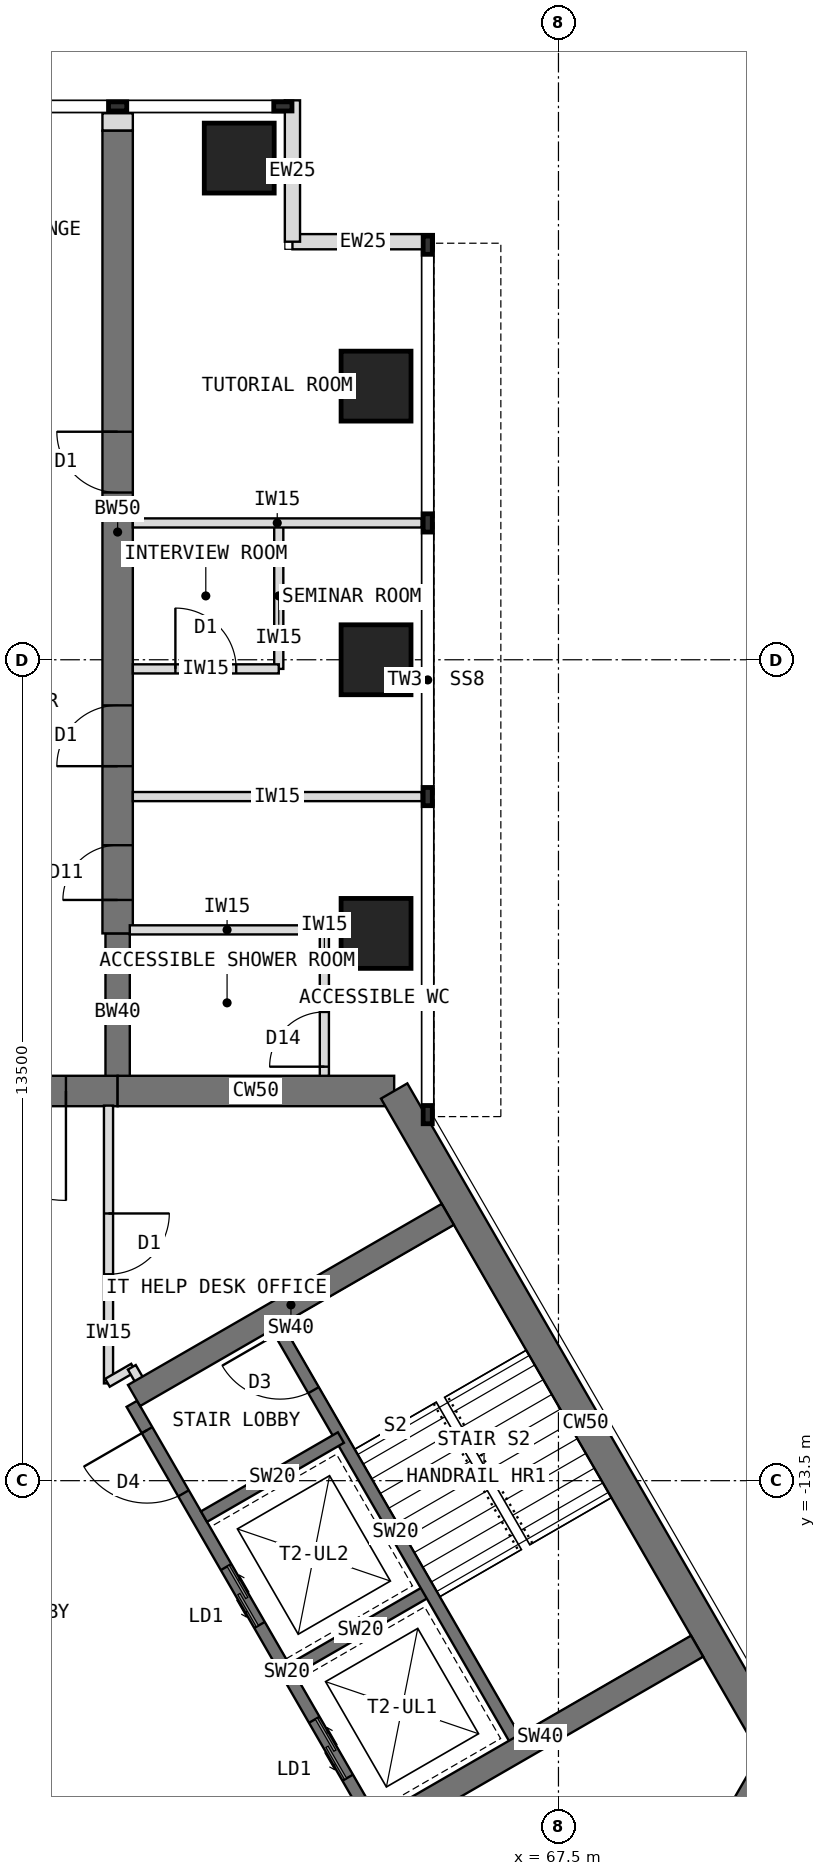
"""IFC4 building model, lengths in metres.
Left out: names, types, materials, properties, quantities, classifications, styles, units other than length and angle.
Written with IfcOpenShell. Run it as: python <this file> out.ifc"""

import sys

from ifc_helpers import new_model, si_unit, direction, frame, frame_2d, origin, origin_2d, place, context, subcontext, project, spatial, rectangle, extrude, element, fill, save


model = new_model("IFC4")
c1 = context("Model", 3, precision=1e-05, world=origin(), true_north=direction((0.0, 1.0)))
c2 = subcontext(c1, "Body", "Model", "MODEL_VIEW")
j1 = project(units=[si_unit("LENGTHUNIT", "METRE"), si_unit("PLANEANGLEUNIT", "RADIAN")], contexts=[c1])
p1 = place(None, origin())
s1 = spatial("IfcSite", under=j1, at=p1, CompositionType="ELEMENT")
p2 = place(p1, origin())
s2 = spatial("IfcBuilding", under=s1, at=p2, CompositionType="ELEMENT")
p3 = place(p2, frame((0.0, 0.0, 194.5)))
s3 = spatial("IfcBuildingStorey", under=s2, at=p3, CompositionType="ELEMENT", Elevation=194.5)
p4 = place(p3, frame((64.798, -7.092, 0.0), z_axis=(0.0, 0.0, 1.0), x_axis=(-1.0, 0.0, 0.0)))
e1 = element("IfcWall", 1, at=p4, inside=s3, PredefinedType="SHEAR", context=c2, shape_type="SweptSolid", body=[
    extrude(rectangle(XDim=4.548, YDim=0.5, at=frame_2d((2.274, 0.0))), origin(), (0.0, 0.0, 1.0), 4.0),
])
p5 = place(p3, frame((60.25, -7.092, 0.0), z_axis=(0.0, 0.0, 1.0), x_axis=(-1.0, 0.0, 0.0)))
e2 = element("IfcWall", 2, at=p5, inside=s3, PredefinedType="SHEAR", context=c2, shape_type="SweptSolid", body=[
    extrude(rectangle(XDim=3.5, YDim=0.5, at=frame_2d((1.75, 0.0))), origin(), (0.0, 0.0, 1.0), 4.0),
])
p6 = place(p5, frame((0.85, 0.0, 0.0)))
e3 = element("IfcOpeningElement", 3, at=p6, cuts=e2, PredefinedType="OPENING", context=c2, shape_type="SweptSolid", body=[
    extrude(rectangle(XDim=1.8, YDim=2.1, at=frame_2d((0.9, 1.05))), frame((0.0, 0.26, 0.0), z_axis=(0.0, -1.0, 0.0), x_axis=(1.0, 0.0, 0.0)), (0.0, 0.0, 1.0), 0.52),
])
p7 = place(p3, frame((68.822, -21.939, 0.0), z_axis=(0.0, 0.0, 1.0), x_axis=(0.500024481964, 0.866011268655, 0.0)))
e4 = element("IfcWall", 4, at=p7, inside=s3, PredefinedType="SHEAR", context=c2, shape_type="SweptSolid", body=[
    extrude(rectangle(XDim=4.548, YDim=0.5, at=frame_2d((2.274, 0.0))), origin(), (0.0, 0.0, 1.0), 4.0),
])
p8 = place(p3, frame((71.096, -18.0, 0.0), z_axis=(0.0, 0.0, 1.0), x_axis=(-0.500005998175, 0.866021940709, 0.0)))
e5 = element("IfcWall", 5, at=p8, inside=s3, PredefinedType="SHEAR", context=c2, shape_type="SweptSolid", body=[
    extrude(rectangle(XDim=12.596, YDim=0.5, at=frame_2d((6.298, 0.0))), origin(), (0.0, 0.0, 1.0), 4.0),
])
p9 = place(p3, frame((60.25, -7.092, 0.0), z_axis=(0.0, 0.0, 1.0), x_axis=(0.0, 1.0, 0.0)))
e6 = element("IfcWall", 6, at=p9, inside=s3, PredefinedType="SHEAR", context=c2, shape_type="SweptSolid", body=[
    extrude(rectangle(XDim=2.592, YDim=0.4, at=frame_2d((1.296, 0.0))), origin(), (0.0, 0.0, 1.0), 4.0),
])
p10 = place(p3, frame((60.25, -4.5, 0.0), z_axis=(0.0, 0.0, 1.0), x_axis=(0.0, 1.0, 0.0)))
e7 = element("IfcWall", 7, at=p10, inside=s3, PredefinedType="SHEAR", context=c2, shape_type="SweptSolid", body=[
    extrude(rectangle(XDim=13.2, YDim=0.5, at=frame_2d((6.6, 0.0))), origin(), (0.0, 0.0, 1.0), 4.0),
])
p11 = place(p10, frame((0.55, 0.0, 0.0)))
e8 = element("IfcOpeningElement", 8, at=p11, cuts=e7, PredefinedType="OPENING", context=c2, shape_type="SweptSolid", body=[
    extrude(rectangle(XDim=0.9, YDim=2.1, at=frame_2d((0.45, 1.05))), frame((0.0, 0.26, 0.0), z_axis=(0.0, -1.0, 0.0), x_axis=(1.0, 0.0, 0.0)), (0.0, 0.0, 1.0), 0.52),
])
p12 = place(p10, frame((2.75, 0.0, 0.0)))
e9 = element("IfcOpeningElement", 9, at=p12, cuts=e7, PredefinedType="OPENING", context=c2, shape_type="SweptSolid", body=[
    extrude(rectangle(XDim=1.0, YDim=2.1, at=frame_2d((0.5, 1.05))), frame((0.0, 0.26, 0.0), z_axis=(0.0, -1.0, 0.0), x_axis=(1.0, 0.0, 0.0)), (0.0, 0.0, 1.0), 0.52),
])
p13 = place(p10, frame((7.25, 0.0, 0.0)))
e10 = element("IfcOpeningElement", 10, at=p13, cuts=e7, PredefinedType="OPENING", context=c2, shape_type="SweptSolid", body=[
    extrude(rectangle(XDim=1.0, YDim=2.1, at=frame_2d((0.5, 1.05))), frame((0.0, 0.26, 0.0), z_axis=(0.0, -1.0, 0.0), x_axis=(1.0, 0.0, 0.0)), (0.0, 0.0, 1.0), 0.52),
])
for number, where, z_axis, x_axis in (
    (11, (64.5, -4.5, 0.0), (0.0, 0.0, 1.0), (1.0, 0.0, 0.0)),
    (12, (64.5, 0.0, 0.0), (0.0, 0.0, 1.0), (1.0, 0.0, 0.0)),
    (13, (64.5, 4.5, 0.0), (0.0, 0.0, 1.0), (1.0, 0.0, 0.0)),
    (14, (62.25, 8.25, 0.0), (0.0, 0.0, 1.0), (1.0, 0.0, 0.0)),
):
    element("IfcColumn", number, at=place(p3, frame(where, z_axis=z_axis, x_axis=x_axis)), inside=s3, PredefinedType="COLUMN", context=c2, shape_type="SweptSolid", body=[
        extrude(rectangle(XDim=1.15, YDim=1.15, at=origin_2d()), origin(), (0.0, 0.0, 1.0), 4.0),
    ])
for number, where, z_axis, x_axis in (
    (15, (65.45, 6.875, 0.0), (0.0, 0.0, 1.0), (-1.0, 0.0, 0.0)),
    (16, (63.125, 6.875, 0.0), (0.0, 0.0, 1.0), (0.0, 1.0, 0.0)),
):
    element("IfcWall", number, at=place(p3, frame(where, z_axis=z_axis, x_axis=x_axis)), inside=s3, PredefinedType="STANDARD", context=c2, shape_type="SweptSolid", body=[
        extrude(rectangle(XDim=2.325, YDim=0.25, at=frame_2d((1.163, 0.0))), origin(), (0.0, 0.0, 1.0), 3.8),
    ])
p14 = place(p3, frame((60.25, 8.7, 0.0), z_axis=(0.0, 0.0, 1.0), x_axis=(0.0, 1.0, 0.0)))
e17 = element("IfcWall", 17, at=p14, inside=s3, PredefinedType="PARTITIONING", context=c2, shape_type="SweptSolid", body=[
    extrude(rectangle(XDim=0.288, YDim=0.5, at=frame_2d((0.144, 0.0))), origin(), (0.0, 0.0, 1.0), 3.8),
])
p15 = place(p3, frame((64.484, -19.164, 0.0), z_axis=(0.0, 0.0, 1.0), x_axis=(-0.49999894854, 0.866026010844, 0.0)))
e18 = element("IfcWall", 18, at=p15, inside=s3, PredefinedType="SHEAR", context=c2, shape_type="SweptSolid", body=[
    extrude(rectangle(XDim=8.0, YDim=0.2, at=frame_2d((4.0, 0.0))), origin(), (0.0, 0.0, 1.0), 4.0),
])
p16 = place(p15, frame((6.3, 0.0, 0.0)))
e19 = element("IfcOpeningElement", 19, at=p16, cuts=e18, PredefinedType="OPENING", context=c2, shape_type="SweptSolid", body=[
    extrude(rectangle(XDim=1.2, YDim=2.1, at=frame_2d((0.6, 1.05))), frame((0.0, 0.11, 0.0), z_axis=(0.0, -1.0, 0.0), x_axis=(1.0, 0.0, 0.0)), (0.0, 0.0, 1.0), 0.22),
])
p17 = place(p15, frame((0.9, 0.0, 0.0)))
e20 = element("IfcOpeningElement", 20, at=p17, cuts=e18, PredefinedType="OPENING", context=c2, shape_type="SweptSolid", body=[
    extrude(rectangle(XDim=1.1, YDim=2.2, at=frame_2d((0.55, 1.1))), frame((0.0, 0.11, 0.0), z_axis=(0.0, -1.0, 0.0), x_axis=(1.0, 0.0, 0.0)), (0.0, 0.0, 1.0), 0.22),
])
p18 = place(p15, frame((3.8, 0.0, 0.0)))
e21 = element("IfcOpeningElement", 21, at=p18, cuts=e18, PredefinedType="OPENING", context=c2, shape_type="SweptSolid", body=[
    extrude(rectangle(XDim=1.1, YDim=2.2, at=frame_2d((0.55, 1.1))), frame((0.0, 0.11, 0.0), z_axis=(0.0, -1.0, 0.0), x_axis=(1.0, 0.0, 0.0)), (0.0, 0.0, 1.0), 0.22),
])
p19 = place(p3, frame((63.12, -16.603, 0.0), z_axis=(0.0, 0.0, 1.0), x_axis=(0.866062058628, 0.499936506574, 0.0)))
e22 = element("IfcWall", 22, at=p19, inside=s3, PredefinedType="SHEAR", context=c2, shape_type="SweptSolid", body=[
    extrude(rectangle(XDim=2.6, YDim=0.2, at=frame_2d((1.3, 0.0))), origin(), (0.0, 0.0, 1.0), 4.0),
])
p20 = place(p3, frame((61.67, -14.091, 0.0), z_axis=(0.0, 0.0, 1.0), x_axis=(0.86603858612, 0.49997716683, 0.0)))
e23 = element("IfcWall", 23, at=p20, inside=s3, PredefinedType="SHEAR", context=c2, shape_type="SweptSolid", body=[
    extrude(rectangle(XDim=2.6, YDim=0.2, at=frame_2d((1.3, 0.0))), origin(), (0.0, 0.0, 1.0), 4.0),
])
p21 = place(p3, frame((66.822, -17.814, 0.0), z_axis=(0.0, 0.0, 1.0), x_axis=(-0.49999894854, 0.866026010844, 0.0)))
e24 = element("IfcWall", 24, at=p21, inside=s3, PredefinedType="SHEAR", context=c2, shape_type="SweptSolid", body=[
    extrude(rectangle(XDim=8.0, YDim=0.2, at=frame_2d((4.0, 0.0))), origin(), (0.0, 0.0, 1.0), 4.0),
])
p22 = place(p21, frame((6.7, 0.0, 0.0)))
e25 = element("IfcOpeningElement", 25, at=p22, cuts=e24, PredefinedType="OPENING", context=c2, shape_type="SweptSolid", body=[
    extrude(rectangle(XDim=1.1, YDim=2.1, at=frame_2d((0.55, 1.05))), frame((0.0, 0.11, 0.0), z_axis=(0.0, -1.0, 0.0), x_axis=(1.0, 0.0, 0.0)), (0.0, 0.0, 1.0), 0.22),
])
p23 = place(p3, frame((60.52, -12.099, 0.0), z_axis=(0.0, 0.0, 1.0), x_axis=(0.86602319114, 0.500003832394, 0.0)))
e26 = element("IfcWall", 26, at=p23, inside=s3, PredefinedType="SHEAR", context=c2, shape_type="SweptSolid", body=[
    extrude(rectangle(XDim=5.958, YDim=0.4, at=frame_2d((2.979, 0.0))), origin(), (0.0, 0.0, 1.0), 4.0),
])
p24 = place(p3, frame((64.62, -19.201, 0.0), z_axis=(0.0, 0.0, 1.0), x_axis=(0.866012946976, 0.500021575205, 0.0)))
e27 = element("IfcWall", 27, at=p24, inside=s3, PredefinedType="SHEAR", context=c2, shape_type="SweptSolid", body=[
    extrude(rectangle(XDim=5.958, YDim=0.4, at=frame_2d((2.979, 0.0))), origin(), (0.0, 0.0, 1.0), 4.0),
])
for number, where, z_axis, x_axis in (
    (28, (60.5, -2.25, 0.0), (0.0, 0.0, 1.0), (1.0, 0.0, 0.0)),
    (29, (60.5, 2.25, 0.0), (0.0, 0.0, 1.0), (1.0, 0.0, 0.0)),
):
    element("IfcWall", number, at=place(p3, frame(where, z_axis=z_axis, x_axis=x_axis)), inside=s3, PredefinedType="PARTITIONING", context=c2, shape_type="SweptSolid", body=[
        extrude(rectangle(XDim=4.75, YDim=0.15, at=frame_2d((2.375, 0.0))), origin(), (0.0, 0.0, 1.0), 3.8),
    ])
p25 = place(p3, frame((62.9, -0.15, 0.0), z_axis=(0.0, 0.0, 1.0), x_axis=(0.0, 1.0, 0.0)))
e30 = element("IfcWall", 30, at=p25, inside=s3, PredefinedType="PARTITIONING", context=c2, shape_type="SweptSolid", body=[
    extrude(rectangle(XDim=2.4, YDim=0.15, at=frame_2d((1.2, 0.0))), origin(), (0.0, 0.0, 1.0), 3.8),
])
p26 = place(p3, frame((60.5, -0.15, 0.0), z_axis=(0.0, 0.0, 1.0), x_axis=(1.0, 0.0, 0.0)))
e31 = element("IfcWall", 31, at=p26, inside=s3, PredefinedType="PARTITIONING", context=c2, shape_type="SweptSolid", body=[
    extrude(rectangle(XDim=2.4, YDim=0.15, at=frame_2d((1.2, 0.0))), origin(), (0.0, 0.0, 1.0), 3.8),
])
p27 = place(p26, frame((0.7, 0.0, 0.0)))
e32 = element("IfcOpeningElement", 32, at=p27, cuts=e31, PredefinedType="OPENING", context=c2, shape_type="SweptSolid", body=[
    extrude(rectangle(XDim=1.0, YDim=2.1, at=frame_2d((0.5, 1.05))), frame((0.0, 0.085, 0.0), z_axis=(0.0, -1.0, 0.0), x_axis=(1.0, 0.0, 0.0)), (0.0, 0.0, 1.0), 0.17),
])
p28 = place(p3, frame((63.65, -6.842, 0.0), z_axis=(0.0, 0.0, 1.0), x_axis=(0.0, 1.0, 0.0)))
e33 = element("IfcWall", 33, at=p28, inside=s3, PredefinedType="PARTITIONING", context=c2, shape_type="SweptSolid", body=[
    extrude(rectangle(XDim=2.4, YDim=0.15, at=frame_2d((1.2, 0.0))), origin(), (0.0, 0.0, 1.0), 3.8),
])
p29 = place(p28, frame((0.15, 0.0, 0.0)))
e34 = element("IfcOpeningElement", 34, at=p29, cuts=e33, PredefinedType="OPENING", context=c2, shape_type="SweptSolid", body=[
    extrude(rectangle(XDim=0.9, YDim=2.1, at=frame_2d((0.45, 1.05))), frame((0.0, 0.085, 0.0), z_axis=(0.0, -1.0, 0.0), x_axis=(1.0, 0.0, 0.0)), (0.0, 0.0, 1.0), 0.17),
])
p30 = place(p3, frame((60.45, -4.442, 0.0), z_axis=(0.0, 0.0, 1.0), x_axis=(1.0, 0.0, 0.0)))
e35 = element("IfcWall", 35, at=p30, inside=s3, PredefinedType="PARTITIONING", context=c2, shape_type="SweptSolid", body=[
    extrude(rectangle(XDim=3.2, YDim=0.15, at=frame_2d((1.6, 0.0))), origin(), (0.0, 0.0, 1.0), 3.267),
])
p31 = place(p3, frame((60.1, -7.332, 0.0), z_axis=(0.0, 0.0, 1.0), x_axis=(0.0, -1.0, 0.0)))
e36 = element("IfcWall", 36, at=p31, inside=s3, PredefinedType="PARTITIONING", context=c2, shape_type="SweptSolid", body=[
    extrude(rectangle(XDim=4.568, YDim=0.15, at=frame_2d((2.284, 0.0))), origin(), (0.0, 0.0, 1.0), 3.8),
])
p32 = place(p31, frame((1.774, 0.0, 0.0)))
e37 = element("IfcOpeningElement", 37, at=p32, cuts=e36, PredefinedType="OPENING", context=c2, shape_type="SweptSolid", body=[
    extrude(rectangle(XDim=1.0, YDim=2.1, at=frame_2d((0.5, 1.05))), frame((0.0, 0.085, 0.0), z_axis=(0.0, -1.0, 0.0), x_axis=(1.0, 0.0, 0.0)), (0.0, 0.0, 1.0), 0.17),
])
p33 = place(p3, frame((60.083, -11.89, 0.0), z_axis=(0.0, 0.0, 1.0), x_axis=(0.865831790172, 0.50033519877, 0.0)))
e38 = element("IfcWall", 38, at=p33, inside=s3, PredefinedType="PARTITIONING", context=c2, shape_type="SweptSolid", body=[
    extrude(rectangle(XDim=0.494, YDim=0.15, at=frame_2d((0.247, 0.0))), origin(), (0.0, 0.0, 1.0), 3.8),
])
p34 = place(p3, frame((60.483, -11.635, 0.0), z_axis=(0.0, 0.0, 1.0), x_axis=(0.500230298122, -0.865892400268, 0.0)))
e39 = element("IfcWall", 39, at=p34, inside=s3, PredefinedType="PARTITIONING", context=c2, shape_type="SweptSolid", body=[
    extrude(rectangle(XDim=0.43, YDim=0.15, at=frame_2d((0.215, 0.0))), origin(), (0.0, 0.0, 1.0), 3.8),
])
p35 = place(p16, origin())
e40 = element("IfcDoor", 40, at=p35, inside=s3, OperationType="SINGLE_SWING_RIGHT", PredefinedType="DOOR", context=c2, shape_type="SweptSolid", body=[
    extrude(rectangle(XDim=1.2, YDim=2.1, at=frame_2d((0.6, 1.05))), frame((0.0, 0.025, 0.0), z_axis=(0.0, -1.0, 0.0), x_axis=(1.0, 0.0, 0.0)), (0.0, 0.0, 1.0), 0.05),
])
fill(e19, e40)
p36 = place(p17, origin())
e41 = element("IfcDoor", 41, at=p36, inside=s3, OperationType="DOUBLE_DOOR_SLIDING", PredefinedType="DOOR", context=c2, shape_type="SweptSolid", body=[
    extrude(rectangle(XDim=1.1, YDim=2.2, at=frame_2d((0.55, 1.1))), frame((0.0, 0.025, 0.0), z_axis=(0.0, -1.0, 0.0), x_axis=(1.0, 0.0, 0.0)), (0.0, 0.0, 1.0), 0.05),
])
fill(e20, e41)
p37 = place(p18, origin())
e42 = element("IfcDoor", 42, at=p37, inside=s3, OperationType="DOUBLE_DOOR_SLIDING", PredefinedType="DOOR", context=c2, shape_type="SweptSolid", body=[
    extrude(rectangle(XDim=1.1, YDim=2.2, at=frame_2d((0.55, 1.1))), frame((0.0, 0.025, 0.0), z_axis=(0.0, -1.0, 0.0), x_axis=(1.0, 0.0, 0.0)), (0.0, 0.0, 1.0), 0.05),
])
fill(e21, e42)
p38 = place(p22, origin())
e43 = element("IfcDoor", 43, at=p38, inside=s3, OperationType="SINGLE_SWING_RIGHT", PredefinedType="DOOR", context=c2, shape_type="SweptSolid", body=[
    extrude(rectangle(XDim=1.1, YDim=2.1, at=frame_2d((0.55, 1.05))), frame((0.0, 0.025, 0.0), z_axis=(0.0, -1.0, 0.0), x_axis=(1.0, 0.0, 0.0)), (0.0, 0.0, 1.0), 0.05),
])
fill(e25, e43)
p39 = place(p6, origin())
e44 = element("IfcDoor", 44, at=p39, inside=s3, OperationType="DOUBLE_DOOR_DOUBLE_SWING", PredefinedType="DOOR", context=c2, shape_type="SweptSolid", body=[
    extrude(rectangle(XDim=1.8, YDim=2.1, at=frame_2d((0.9, 1.05))), frame((0.0, 0.025, 0.0), z_axis=(0.0, -1.0, 0.0), x_axis=(1.0, 0.0, 0.0)), (0.0, 0.0, 1.0), 0.05),
])
fill(e3, e44)
p40 = place(p27, origin())
e45 = element("IfcDoor", 45, at=p40, inside=s3, OperationType="SINGLE_SWING_LEFT", PredefinedType="DOOR", context=c2, shape_type="SweptSolid", body=[
    extrude(rectangle(XDim=1.0, YDim=2.1, at=frame_2d((0.5, 1.05))), frame((0.0, 0.025, 0.0), z_axis=(0.0, -1.0, 0.0), x_axis=(1.0, 0.0, 0.0)), (0.0, 0.0, 1.0), 0.05),
])
fill(e32, e45)
p41 = place(p29, origin())
e46 = element("IfcDoor", 46, at=p41, inside=s3, OperationType="SINGLE_SWING_LEFT", PredefinedType="DOOR", context=c2, shape_type="SweptSolid", body=[
    extrude(rectangle(XDim=0.9, YDim=2.1, at=frame_2d((0.45, 1.05))), frame((0.0, 0.025, 0.0), z_axis=(0.0, -1.0, 0.0), x_axis=(1.0, 0.0, 0.0)), (0.0, 0.0, 1.0), 0.05),
])
fill(e34, e46)
p42 = place(p32, origin())
e47 = element("IfcDoor", 47, at=p42, inside=s3, OperationType="SINGLE_SWING_LEFT", PredefinedType="DOOR", context=c2, shape_type="SweptSolid", body=[
    extrude(rectangle(XDim=1.0, YDim=2.1, at=frame_2d((0.5, 1.05))), frame((0.0, 0.025, 0.0), z_axis=(0.0, -1.0, 0.0), x_axis=(1.0, 0.0, 0.0)), (0.0, 0.0, 1.0), 0.05),
])
fill(e37, e47)
p43 = place(p11, origin())
e48 = element("IfcDoor", 48, at=p43, inside=s3, OperationType="SINGLE_SWING_LEFT", PredefinedType="DOOR", context=c2, shape_type="SweptSolid", body=[
    extrude(rectangle(XDim=0.9, YDim=2.1, at=frame_2d((0.45, 1.05))), frame((0.0, 0.025, 0.0), z_axis=(0.0, -1.0, 0.0), x_axis=(1.0, 0.0, 0.0)), (0.0, 0.0, 1.0), 0.05),
])
fill(e8, e48)
p44 = place(p12, origin())
e49 = element("IfcDoor", 49, at=p44, inside=s3, OperationType="SINGLE_SWING_LEFT", PredefinedType="DOOR", context=c2, shape_type="SweptSolid", body=[
    extrude(rectangle(XDim=1.0, YDim=2.1, at=frame_2d((0.5, 1.05))), frame((0.0, 0.025, 0.0), z_axis=(0.0, -1.0, 0.0), x_axis=(1.0, 0.0, 0.0)), (0.0, 0.0, 1.0), 0.05),
])
fill(e9, e49)
p45 = place(p13, origin())
e50 = element("IfcDoor", 50, at=p45, inside=s3, OperationType="SINGLE_SWING_RIGHT", PredefinedType="DOOR", context=c2, shape_type="SweptSolid", body=[
    extrude(rectangle(XDim=1.0, YDim=2.1, at=frame_2d((0.5, 1.05))), frame((0.0, 0.025, 0.0), z_axis=(0.0, -1.0, 0.0), x_axis=(1.0, 0.0, 0.0)), (0.0, 0.0, 1.0), 0.05),
])
fill(e10, e50)
save(model, sys.argv[1])
